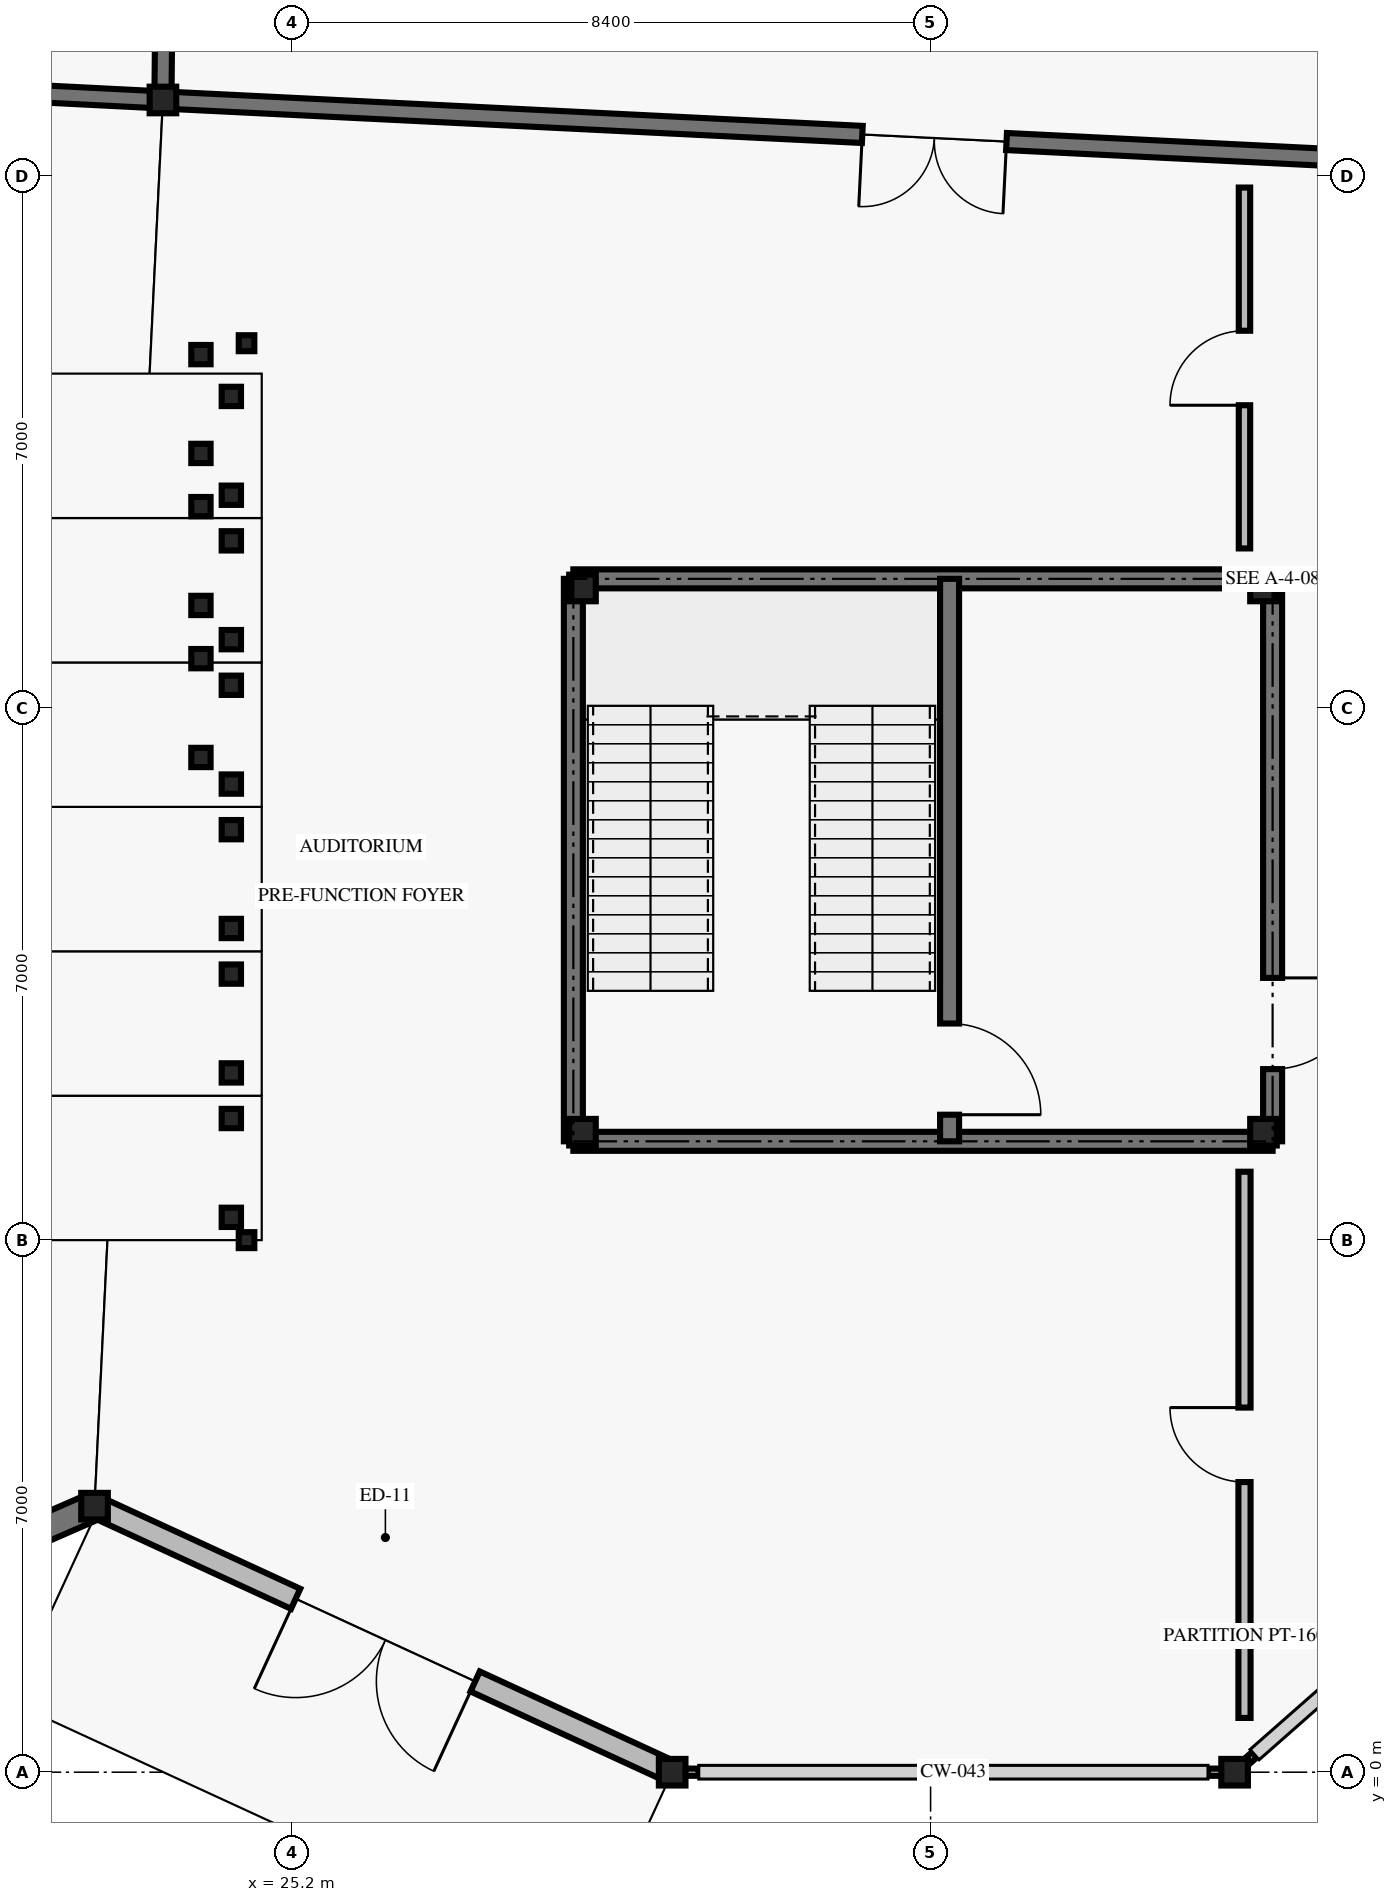
"""IFC4 building model, lengths in metres.
Left out: names, types, materials, properties, quantities, classifications, styles, units other than length and angle.
Written with IfcOpenShell. Run it as: python <this file> out.ifc"""

import sys

from ifc_helpers import new_model, si_unit, direction, frame, frame_2d, origin, origin_2d, place, context, subcontext, project, spatial, rectangle, i_section, extrude, element, fill, save


model = new_model("IFC4")
c1 = context("Model", 3, precision=1e-05, world=origin(), true_north=direction((0.0, 1.0)))
c2 = subcontext(c1, "Body", "Model", "MODEL_VIEW")
j1 = project(units=[si_unit("LENGTHUNIT", "METRE"), si_unit("PLANEANGLEUNIT", "RADIAN")], contexts=[c1])
p1 = place(None, origin())
s1 = spatial("IfcSite", under=j1, at=p1, CompositionType="ELEMENT")
p2 = place(p1, origin())
s2 = spatial("IfcBuilding", under=s1, at=p2, CompositionType="ELEMENT")
p3 = place(p2, origin())
s3 = spatial("IfcBuildingStorey", under=s2, at=p3, CompositionType="ELEMENT", Elevation=0.0)
for number, where, z_axis, x_axis in (
    (1, (22.6, 3.5, 0.0), (0.0, 0.0, 1.0), (1.0, 0.0, 0.0)),
    (2, (23.5, 22.0, 0.0), (0.0, 0.0, 1.0), (1.0, 0.0, 0.0)),
    (3, (30.2, 0.0, 0.0), (0.0, 0.0, 1.0), (1.0, 0.0, 0.0)),
    (4, (37.6, 0.0, 0.0), (0.0, 0.0, 1.0), (1.0, 0.0, 0.0)),
    (5, (29.02, 8.42, 0.0), (0.0, 0.0, 1.0), (1.0, 0.0, 0.0)),
    (6, (37.98, 8.42, 0.0), (0.0, 0.0, 1.0), (1.0, 0.0, 0.0)),
    (7, (37.98, 15.58, 0.0), (0.0, 0.0, 1.0), (1.0, 0.0, 0.0)),
    (8, (29.02, 15.58, 0.0), (0.0, 0.0, 1.0), (1.0, 0.0, 0.0)),
):
    element("IfcColumn", number, at=place(p3, frame(where, z_axis=z_axis, x_axis=x_axis)), inside=s3, PredefinedType="COLUMN", context=c2, shape_type="SweptSolid", body=[
        extrude(i_section(OverallWidth=0.35, OverallDepth=0.35, WebThickness=0.02, FlangeThickness=0.028, at=origin_2d()), origin(), (0.0, 0.0, 1.0), 5.4),
    ])
for number, where, z_axis, x_axis in (
    (9, (24.6, 7.0, 0.0), (0.0, 0.0, 1.0), (1.0, 0.0, 0.0)),
    (10, (24.6, 18.8, 0.0), (0.0, 0.0, 1.0), (1.0, 0.0, 0.0)),
):
    element("IfcColumn", number, at=place(p3, frame(where, z_axis=z_axis, x_axis=x_axis)), inside=s3, PredefinedType="COLUMN", context=c2, shape_type="SweptSolid", body=[
        extrude(i_section(OverallWidth=0.205, OverallDepth=0.21, WebThickness=0.009, FlangeThickness=0.014, FilletRadius=0.01, at=origin_2d()), origin(), (0.0, 0.0, 1.0), 5.4),
    ])
for number, where, z_axis, x_axis in (
    (11, (24.4, 7.3, 0.0), (0.0, 0.0, 1.0), (1.0, 0.0, 0.0)),
    (12, (24.4, 8.6, 0.0), (0.0, 0.0, 1.0), (1.0, 0.0, 0.0)),
):
    element("IfcColumn", number, at=place(p3, frame(where, z_axis=z_axis, x_axis=x_axis)), inside=s3, PredefinedType="COLUMN", context=c2, shape_type="SweptSolid", body=[
        extrude(i_section(OverallWidth=0.254, OverallDepth=0.254, WebThickness=0.009, FlangeThickness=0.014, FilletRadius=0.013, at=origin_2d()), origin(), (0.0, 0.0, 1.0), 0.255),
    ])
for number, where, z_axis, x_axis in (
    (13, (24.4, 9.2, 0.0), (0.0, 0.0, 1.0), (1.0, 0.0, 0.0)),
    (14, (24.4, 10.5, 0.0), (0.0, 0.0, 1.0), (1.0, 0.0, 0.0)),
):
    element("IfcColumn", number, at=place(p3, frame(where, z_axis=z_axis, x_axis=x_axis)), inside=s3, PredefinedType="COLUMN", context=c2, shape_type="SweptSolid", body=[
        extrude(i_section(OverallWidth=0.254, OverallDepth=0.254, WebThickness=0.009, FlangeThickness=0.014, FilletRadius=0.013, at=origin_2d()), origin(), (0.0, 0.0, 1.0), 0.675),
    ])
for number, where, z_axis, x_axis in (
    (15, (24.4, 11.1, 0.0), (0.0, 0.0, 1.0), (1.0, 0.0, 0.0)),
    (16, (24.4, 12.4, 0.0), (0.0, 0.0, 1.0), (1.0, 0.0, 0.0)),
):
    element("IfcColumn", number, at=place(p3, frame(where, z_axis=z_axis, x_axis=x_axis)), inside=s3, PredefinedType="COLUMN", context=c2, shape_type="SweptSolid", body=[
        extrude(i_section(OverallWidth=0.254, OverallDepth=0.254, WebThickness=0.009, FlangeThickness=0.014, FilletRadius=0.013, at=origin_2d()), origin(), (0.0, 0.0, 1.0), 1.095),
    ])
for number, where, z_axis, x_axis in (
    (17, (24.4, 13.0, 0.0), (0.0, 0.0, 1.0), (1.0, 0.0, 0.0)),
    (18, (24.4, 14.3, 0.0), (0.0, 0.0, 1.0), (1.0, 0.0, 0.0)),
):
    element("IfcColumn", number, at=place(p3, frame(where, z_axis=z_axis, x_axis=x_axis)), inside=s3, PredefinedType="COLUMN", context=c2, shape_type="SweptSolid", body=[
        extrude(i_section(OverallWidth=0.254, OverallDepth=0.254, WebThickness=0.009, FlangeThickness=0.014, FilletRadius=0.013, at=origin_2d()), origin(), (0.0, 0.0, 1.0), 1.515),
    ])
for number, where, z_axis, x_axis in (
    (19, (24.4, 14.9, 0.0), (0.0, 0.0, 1.0), (1.0, 0.0, 0.0)),
    (20, (24.4, 16.2, 0.0), (0.0, 0.0, 1.0), (1.0, 0.0, 0.0)),
):
    element("IfcColumn", number, at=place(p3, frame(where, z_axis=z_axis, x_axis=x_axis)), inside=s3, PredefinedType="COLUMN", context=c2, shape_type="SweptSolid", body=[
        extrude(i_section(OverallWidth=0.254, OverallDepth=0.254, WebThickness=0.009, FlangeThickness=0.014, FilletRadius=0.013, at=origin_2d()), origin(), (0.0, 0.0, 1.0), 1.935),
    ])
for number, where, z_axis, x_axis in (
    (21, (24.4, 16.8, 0.0), (0.0, 0.0, 1.0), (1.0, 0.0, 0.0)),
    (22, (24.4, 18.1, 0.0), (0.0, 0.0, 1.0), (1.0, 0.0, 0.0)),
):
    element("IfcColumn", number, at=place(p3, frame(where, z_axis=z_axis, x_axis=x_axis)), inside=s3, PredefinedType="COLUMN", context=c2, shape_type="SweptSolid", body=[
        extrude(i_section(OverallWidth=0.254, OverallDepth=0.254, WebThickness=0.009, FlangeThickness=0.014, FilletRadius=0.013, at=origin_2d()), origin(), (0.0, 0.0, 1.0), 2.355),
    ])
for number, where, z_axis, x_axis in (
    (23, (24.0, 13.35, 0.0), (0.0, 0.0, 1.0), (1.0, 0.0, 0.0)),
    (24, (24.0, 14.65, 0.0), (0.0, 0.0, 1.0), (1.0, 0.0, 0.0)),
    (25, (24.0, 15.35, 0.0), (0.0, 0.0, 1.0), (1.0, 0.0, 0.0)),
    (26, (24.0, 16.65, 0.0), (0.0, 0.0, 1.0), (1.0, 0.0, 0.0)),
    (27, (24.0, 17.35, 0.0), (0.0, 0.0, 1.0), (1.0, 0.0, 0.0)),
    (28, (24.0, 18.65, 0.0), (0.0, 0.0, 1.0), (1.0, 0.0, 0.0)),
):
    element("IfcColumn", number, at=place(p3, frame(where, z_axis=z_axis, x_axis=x_axis)), inside=s3, PredefinedType="COLUMN", context=c2, shape_type="SweptSolid", body=[
        extrude(i_section(OverallWidth=0.254, OverallDepth=0.254, WebThickness=0.009, FlangeThickness=0.014, FilletRadius=0.013, at=origin_2d()), origin(), (0.0, 0.0, 1.0), 5.4),
    ])
p4 = place(p3, frame((22.545, 3.476, 0.0), z_axis=(0.0, 0.0, 1.0), x_axis=(-0.916148288852, -0.400839510069, 0.0)))
e29 = element("IfcWall", 29, at=p4, inside=s3, PredefinedType="SOLIDWALL", context=c2, shape_type="SweptSolid", body=[
    extrude(rectangle(XDim=8.672, YDim=0.36, at=frame_2d((4.336, 0.0))), origin(), (0.0, 0.0, 1.0), 4.22),
])
p5 = place(p3, frame((30.2, 0.0, 0.0), z_axis=(0.0, 0.0, 1.0), x_axis=(-0.90830827854, 0.418301411827, 0.0)))
e30 = element("IfcWall", 30, at=p5, inside=s3, PredefinedType="SOLIDWALL", context=c2, shape_type="SweptSolid", body=[
    extrude(rectangle(XDim=8.308, YDim=0.29, at=frame_2d((4.154, 0.0))), origin(), (0.0, 0.0, 1.0), 4.22),
])
p6 = place(p5, frame((2.854, 0.0, 0.0)))
e31 = element("IfcOpeningElement", 31, at=p6, cuts=e30, PredefinedType="OPENING", context=c2, shape_type="SweptSolid", body=[
    extrude(rectangle(XDim=2.6, YDim=2.55, at=frame_2d((1.3, 1.275))), frame((0.0, 0.155, 0.0), z_axis=(0.0, -1.0, 0.0), x_axis=(1.0, 0.0, 0.0)), (0.0, 0.0, 1.0), 0.31),
])
for number, where, z_axis, x_axis in (
    (32, (37.558, 0.0, 0.0), (0.0, 0.0, 1.0), (-1.0, 0.0, 0.0)),
    (33, (30.55, 0.0, 0.0), (0.0, 0.0, 1.0), (-1.0, 0.0, 0.0)),
):
    element("IfcWall", number, at=place(p3, frame(where, z_axis=z_axis, x_axis=x_axis)), inside=s3, PredefinedType="SOLIDWALL", context=c2, shape_type="SweptSolid", body=[
        extrude(rectangle(XDim=0.308, YDim=0.095, at=frame_2d((0.154, 0.0))), origin(), (0.0, 0.0, 1.0), 4.22),
    ])
p7 = place(p3, frame((37.863, 0.231, 0.0), z_axis=(0.0, 0.0, 1.0), x_axis=(-0.751296149946, -0.659965222627, 0.0)))
e34 = element("IfcWall", 34, at=p7, inside=s3, PredefinedType="SOLIDWALL", context=c2, shape_type="SweptSolid", body=[
    extrude(rectangle(XDim=0.307, YDim=0.095, at=frame_2d((0.154, 0.0))), origin(), (0.0, 0.0, 1.0), 4.22),
])
p8 = place(p3, frame((23.5, 22.0, 0.0), z_axis=(0.0, 0.0, 1.0), x_axis=(-0.99872706092, 0.050440636263, 0.0)))
e35 = element("IfcWall", 35, at=p8, inside=s3, PredefinedType="SOLIDWALL", context=c2, shape_type="SweptSolid", body=[
    extrude(rectangle(XDim=19.825, YDim=0.225, at=frame_2d((9.913, 0.0))), origin(), (0.0, 0.0, 1.0), 4.62),
])
p9 = place(p8, frame((8.963, 0.0, 0.0)))
e36 = element("IfcOpeningElement", 36, at=p9, cuts=e35, PredefinedType="OPENING", context=c2, shape_type="SweptSolid", body=[
    extrude(rectangle(XDim=1.9, YDim=2.35, at=frame_2d((0.95, 1.175))), frame((0.0, 0.123, 0.0), z_axis=(0.0, -1.0, 0.0), x_axis=(1.0, 0.0, 0.0)), (0.0, 0.0, 1.0), 0.245),
])
p10 = place(p3, frame((43.8, 21.0, 0.0), z_axis=(0.0, 0.0, 1.0), x_axis=(-0.998788882418, 0.049201304434, 0.0)))
e37 = element("IfcWall", 37, at=p10, inside=s3, PredefinedType="SOLIDWALL", context=c2, shape_type="SweptSolid", body=[
    extrude(rectangle(XDim=20.325, YDim=0.225, at=frame_2d((10.162, 0.0))), origin(), (0.0, 0.0, 1.0), 4.62),
])
p11 = place(p10, frame((9.212, 0.0, 0.0)))
e38 = element("IfcOpeningElement", 38, at=p11, cuts=e37, PredefinedType="OPENING", context=c2, shape_type="SweptSolid", body=[
    extrude(rectangle(XDim=1.9, YDim=2.35, at=frame_2d((0.95, 1.175))), frame((0.0, 0.123, 0.0), z_axis=(0.0, -1.0, 0.0), x_axis=(1.0, 0.0, 0.0)), (0.0, 0.0, 1.0), 0.245),
])
p12 = place(p3, frame((23.5, 22.0, 0.0), z_axis=(0.0, 0.0, 1.0), x_axis=(0.009521052802, 0.99995467375, 0.0)))
e39 = element("IfcWall", 39, at=p12, inside=s3, PredefinedType="SOLIDWALL", context=c2, shape_type="SweptSolid", body=[
    extrude(rectangle(XDim=21.001, YDim=0.225, at=frame_2d((10.5, 0.0))), origin(), (0.0, 0.0, 1.0), 4.62),
])
p13 = place(p12, frame((9.575, 0.0, 0.0)))
e40 = element("IfcOpeningElement", 40, at=p13, cuts=e39, PredefinedType="OPENING", context=c2, shape_type="SweptSolid", body=[
    extrude(rectangle(XDim=1.85, YDim=2.4, at=frame_2d((0.925, 1.2))), frame((0.0, 0.123, 0.0), z_axis=(0.0, -1.0, 0.0), x_axis=(1.0, 0.0, 0.0)), (0.0, 0.0, 1.0), 0.245),
])
p14 = place(p3, frame((37.73, 0.714, 0.0), z_axis=(0.0, 0.0, 1.0), x_axis=(0.0, 1.0, 0.0)))
e41 = element("IfcWall", 41, at=p14, inside=s3, PredefinedType="PARTITIONING", context=c2, shape_type="SweptSolid", body=[
    extrude(rectangle(XDim=7.186, YDim=0.16, at=frame_2d((3.593, 0.0))), origin(), (0.0, 0.0, 1.0), 3.92),
])
p15 = place(p14, frame((3.103, 0.0, 0.0)))
e42 = element("IfcOpeningElement", 42, at=p15, cuts=e41, PredefinedType="OPENING", context=c2, shape_type="SweptSolid", body=[
    extrude(rectangle(XDim=0.98, YDim=2.15, at=frame_2d((0.49, 1.075))), frame((0.0, 0.09, 0.0), z_axis=(0.0, -1.0, 0.0), x_axis=(1.0, 0.0, 0.0)), (0.0, 0.0, 1.0), 0.18),
])
p16 = place(p3, frame((37.73, 16.1, 0.0), z_axis=(0.0, 0.0, 1.0), x_axis=(0.0, 1.0, 0.0)))
e43 = element("IfcWall", 43, at=p16, inside=s3, PredefinedType="PARTITIONING", context=c2, shape_type="SweptSolid", body=[
    extrude(rectangle(XDim=4.748, YDim=0.15, at=frame_2d((2.374, 0.0))), origin(), (0.0, 0.0, 1.0), 3.92),
])
p17 = place(p16, frame((1.884, 0.0, 0.0)))
e44 = element("IfcOpeningElement", 44, at=p17, cuts=e43, PredefinedType="OPENING", context=c2, shape_type="SweptSolid", body=[
    extrude(rectangle(XDim=0.98, YDim=2.15, at=frame_2d((0.49, 1.075))), frame((0.0, 0.085, 0.0), z_axis=(0.0, -1.0, 0.0), x_axis=(1.0, 0.0, 0.0)), (0.0, 0.0, 1.0), 0.17),
])
p18 = place(p3, frame((28.9, 8.3, 0.0), z_axis=(0.0, 0.0, 1.0), x_axis=(0.0, 1.0, 0.0)))
e45 = element("IfcWall", 45, at=p18, inside=s3, PredefinedType="SHEAR", context=c2, shape_type="SweptSolid", body=[
    extrude(rectangle(XDim=7.4, YDim=0.25, at=frame_2d((3.7, 0.0))), origin(), (0.0, 0.0, 1.0), 5.16),
])
for number, where, z_axis, x_axis in (
    (46, (28.9, 15.7, 0.0), (0.0, 0.0, 1.0), (1.0, 0.0, 0.0)),
    (47, (38.1, 8.3, 0.0), (0.0, 0.0, 1.0), (-1.0, 0.0, 0.0)),
):
    element("IfcWall", number, at=place(p3, frame(where, z_axis=z_axis, x_axis=x_axis)), inside=s3, PredefinedType="SHEAR", context=c2, shape_type="SweptSolid", body=[
        extrude(rectangle(XDim=9.2, YDim=0.25, at=frame_2d((4.6, 0.0))), origin(), (0.0, 0.0, 1.0), 5.16),
    ])
p19 = place(p3, frame((38.1, 15.7, 0.0), z_axis=(0.0, 0.0, 1.0), x_axis=(0.0, -1.0, 0.0)))
e48 = element("IfcWall", 48, at=p19, inside=s3, PredefinedType="SHEAR", context=c2, shape_type="SweptSolid", body=[
    extrude(rectangle(XDim=7.4, YDim=0.25, at=frame_2d((3.7, 0.0))), origin(), (0.0, 0.0, 1.0), 5.16),
])
p20 = place(p19, frame((5.25, 0.0, 0.0)))
e49 = element("IfcOpeningElement", 49, at=p20, cuts=e48, PredefinedType="OPENING", context=c2, shape_type="SweptSolid", body=[
    extrude(rectangle(XDim=1.2, YDim=2.2, at=frame_2d((0.6, 1.1))), frame((0.0, 0.135, 0.0), z_axis=(0.0, -1.0, 0.0), x_axis=(1.0, 0.0, 0.0)), (0.0, 0.0, 1.0), 0.27),
])
p21 = place(p3, frame((33.85, 15.7, 0.0), z_axis=(0.0, 0.0, 1.0), x_axis=(0.0, -1.0, 0.0)))
e50 = element("IfcWall", 50, at=p21, inside=s3, PredefinedType="SHEAR", context=c2, shape_type="SweptSolid", body=[
    extrude(rectangle(XDim=7.4, YDim=0.25, at=frame_2d((3.7, 0.0))), origin(), (0.0, 0.0, 1.0), 5.16),
])
p22 = place(p21, frame((5.85, 0.0, 0.0)))
e51 = element("IfcOpeningElement", 51, at=p22, cuts=e50, PredefinedType="OPENING", context=c2, shape_type="SweptSolid", body=[
    extrude(rectangle(XDim=1.2, YDim=2.2, at=frame_2d((0.6, 1.1))), frame((0.0, 0.135, 0.0), z_axis=(0.0, -1.0, 0.0), x_axis=(1.0, 0.0, 0.0)), (0.0, 0.0, 1.0), 0.27),
])
p23 = place(p6, origin())
e52 = element("IfcDoor", 52, at=p23, inside=s3, OperationType="DOUBLE_DOOR_SINGLE_SWING", PredefinedType="DOOR", context=c2, shape_type="SweptSolid", body=[
    extrude(rectangle(XDim=2.6, YDim=2.55, at=frame_2d((1.3, 1.275))), frame((0.0, 0.025, 0.0), z_axis=(0.0, -1.0, 0.0), x_axis=(1.0, 0.0, 0.0)), (0.0, 0.0, 1.0), 0.05),
])
fill(e31, e52)
p24 = place(p11, origin())
e53 = element("IfcDoor", 53, at=p24, inside=s3, OperationType="DOUBLE_DOOR_SINGLE_SWING", PredefinedType="DOOR", context=c2, shape_type="SweptSolid", body=[
    extrude(rectangle(XDim=1.9, YDim=2.35, at=frame_2d((0.95, 1.175))), frame((0.0, 0.025, 0.0), z_axis=(0.0, -1.0, 0.0), x_axis=(1.0, 0.0, 0.0)), (0.0, 0.0, 1.0), 0.05),
])
fill(e38, e53)
p25 = place(p15, origin())
e54 = element("IfcDoor", 54, at=p25, inside=s3, OperationType="SINGLE_SWING_RIGHT", PredefinedType="DOOR", context=c2, shape_type="SweptSolid", body=[
    extrude(rectangle(XDim=0.98, YDim=2.15, at=frame_2d((0.49, 1.075))), frame((0.0, 0.025, 0.0), z_axis=(0.0, -1.0, 0.0), x_axis=(1.0, 0.0, 0.0)), (0.0, 0.0, 1.0), 0.05),
])
fill(e42, e54)
p26 = place(p17, origin())
e55 = element("IfcDoor", 55, at=p26, inside=s3, OperationType="SINGLE_SWING_LEFT", PredefinedType="DOOR", context=c2, shape_type="SweptSolid", body=[
    extrude(rectangle(XDim=0.98, YDim=2.15, at=frame_2d((0.49, 1.075))), frame((0.0, 0.025, 0.0), z_axis=(0.0, -1.0, 0.0), x_axis=(1.0, 0.0, 0.0)), (0.0, 0.0, 1.0), 0.05),
])
fill(e44, e55)
p27 = place(p20, origin())
e56 = element("IfcDoor", 56, at=p27, inside=s3, OperationType="SINGLE_SWING_LEFT", PredefinedType="DOOR", context=c2, shape_type="SweptSolid", body=[
    extrude(rectangle(XDim=1.2, YDim=2.2, at=frame_2d((0.6, 1.1))), frame((0.0, 0.025, 0.0), z_axis=(0.0, -1.0, 0.0), x_axis=(1.0, 0.0, 0.0)), (0.0, 0.0, 1.0), 0.05),
])
fill(e49, e56)
p28 = place(p22, origin())
e57 = element("IfcDoor", 57, at=p28, inside=s3, OperationType="SINGLE_SWING_RIGHT", PredefinedType="DOOR", context=c2, shape_type="SweptSolid", body=[
    extrude(rectangle(XDim=1.2, YDim=2.2, at=frame_2d((0.6, 1.1))), frame((0.0, 0.025, 0.0), z_axis=(0.0, -1.0, 0.0), x_axis=(1.0, 0.0, 0.0)), (0.0, 0.0, 1.0), 0.05),
])
fill(e51, e57)
save(model, sys.argv[1])
